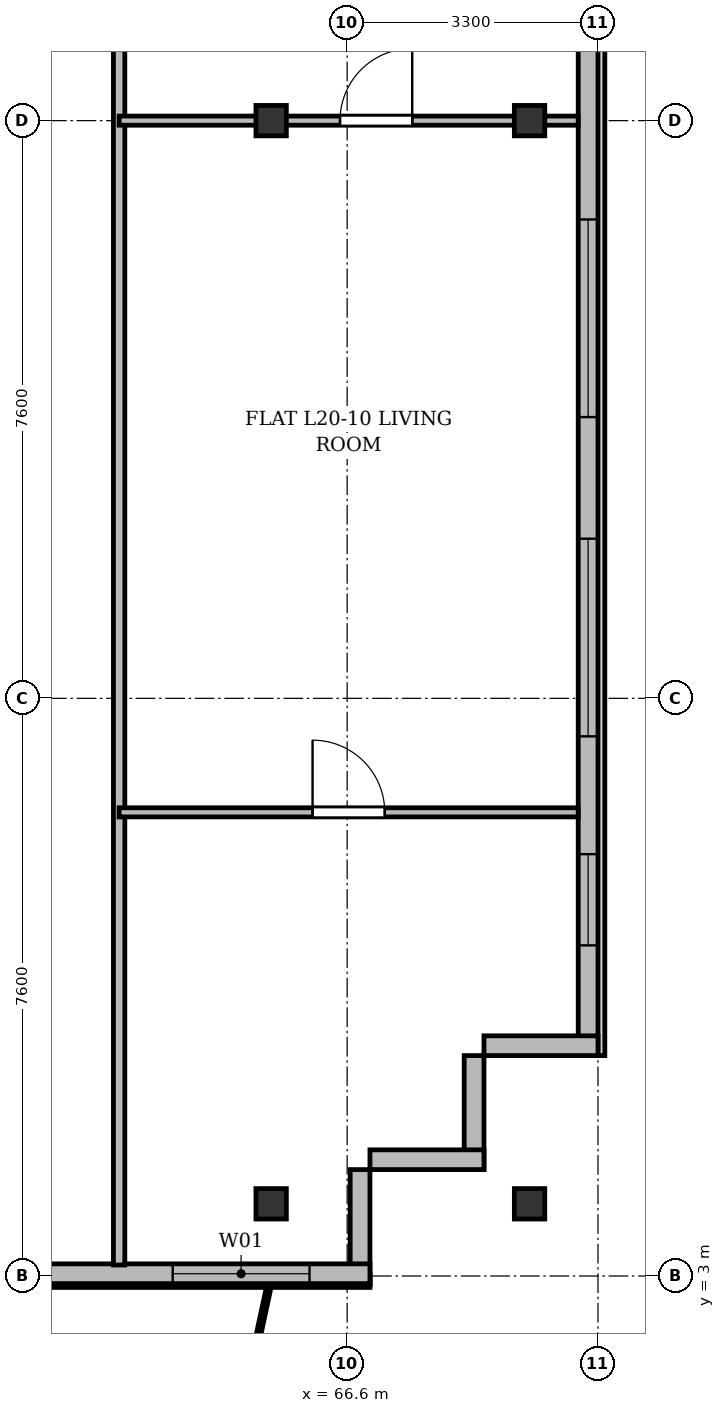
"""IFC4 building model, lengths in metres.
Left out: names, types, materials, properties, quantities, classifications, styles, units other than length and angle.
Written with IfcOpenShell. Run it as: python <this file> out.ifc"""

import sys

from ifc_helpers import new_model, si_unit, direction, frame, frame_2d, origin, origin_2d, place, context, subcontext, project, spatial, rectangle, i_section, extrude, source, transform, mapped, element, fill, save


model = new_model("IFC4")
c1 = context("Model", 3, precision=1e-05, world=origin(), true_north=direction((0.0, 1.0)))
c2 = subcontext(c1, "Body", "Model", "MODEL_VIEW")
j1 = project(units=[si_unit("LENGTHUNIT", "METRE"), si_unit("PLANEANGLEUNIT", "RADIAN")], contexts=[c1])
p1 = place(None, origin())
s1 = spatial("IfcSite", under=j1, at=p1, CompositionType="ELEMENT")
p2 = place(p1, origin())
s2 = spatial("IfcBuilding", under=s1, at=p2, CompositionType="ELEMENT")
p3 = place(p2, frame((0.0, 0.0, 81.7)))
s3 = spatial("IfcBuildingStorey", under=s2, at=p3, CompositionType="ELEMENT", Elevation=81.7)
m1 = source(origin(), c2, "Body", "SweptSolid", [
    extrude(i_section(OverallWidth=0.4, OverallDepth=0.4, WebThickness=0.022, FlangeThickness=0.035, at=origin_2d()), origin(), (0.0, 0.0, 1.0), 3.6),
])
for number, where, z_axis, x_axis in (
    (1, (65.6, 3.95, 0.0), (0.0, 0.0, 1.0), (1.0, 0.0, 0.0)),
    (2, (65.6, 18.2, 0.0), (0.0, 0.0, 1.0), (1.0, 0.0, 0.0)),
    (3, (69.0, 3.95, 0.0), (0.0, 0.0, 1.0), (1.0, 0.0, 0.0)),
    (4, (69.0, 18.2, 0.0), (0.0, 0.0, 1.0), (1.0, 0.0, 0.0)),
):
    element("IfcColumn", number, at=place(p3, frame(where, z_axis=z_axis, x_axis=x_axis)), inside=s3, PredefinedType="COLUMN", context=c2, shape_type="MappedRepresentation", body=[
        mapped(m1, transform((0.0, 0.0, 0.0), x_axis=(1.0, 0.0, 0.0), y_axis=(0.0, 1.0, 0.0), z_axis=(0.0, 0.0, 1.0), scale=1.0)),
    ])
p4 = place(p3, frame((69.77, 45.5, 0.0), z_axis=(0.0, 0.0, 1.0), x_axis=(0.0, -1.0, 0.0)))
e5 = element("IfcWall", 5, at=p4, inside=s3, PredefinedType="SOLIDWALL", context=c2, shape_type="SweptSolid", body=[
    extrude(rectangle(XDim=39.6, YDim=0.26, at=frame_2d((19.8, 0.0))), origin(), (0.0, 0.0, 1.0), 3.34),
])
p5 = place(p4, frame((36.95, 0.0, 0.92)))
e6 = element("IfcOpeningElement", 6, at=p5, cuts=e5, PredefinedType="OPENING", context=c2, shape_type="SweptSolid", body=[
    extrude(rectangle(XDim=1.2, YDim=1.65, at=frame_2d((0.6, 0.825))), frame((0.0, 0.14, 0.0), z_axis=(0.0, -1.0, 0.0), x_axis=(1.0, 0.0, 0.0)), (0.0, 0.0, 1.0), 0.28),
])
p6 = place(p4, frame((32.8, 0.0, 0.92)))
e7 = element("IfcOpeningElement", 7, at=p6, cuts=e5, PredefinedType="OPENING", context=c2, shape_type="SweptSolid", body=[
    extrude(rectangle(XDim=2.6, YDim=1.9, at=frame_2d((1.3, 0.95))), frame((0.0, 0.14, 0.0), z_axis=(0.0, -1.0, 0.0), x_axis=(1.0, 0.0, 0.0)), (0.0, 0.0, 1.0), 0.28),
])
p7 = place(p4, frame((28.6, 0.0, 0.92)))
e8 = element("IfcOpeningElement", 8, at=p7, cuts=e5, PredefinedType="OPENING", context=c2, shape_type="SweptSolid", body=[
    extrude(rectangle(XDim=2.6, YDim=1.9, at=frame_2d((1.3, 0.95))), frame((0.0, 0.14, 0.0), z_axis=(0.0, -1.0, 0.0), x_axis=(1.0, 0.0, 0.0)), (0.0, 0.0, 1.0), 0.28),
])
p8 = place(p4, frame((21.4, 0.0, 0.92)))
e9 = element("IfcOpeningElement", 9, at=p8, cuts=e5, PredefinedType="OPENING", context=c2, shape_type="SweptSolid", body=[
    extrude(rectangle(XDim=2.6, YDim=1.9, at=frame_2d((1.3, 0.95))), frame((0.0, 0.14, 0.0), z_axis=(0.0, -1.0, 0.0), x_axis=(1.0, 0.0, 0.0)), (0.0, 0.0, 1.0), 0.28),
])
p9 = place(p4, frame((7.4, 0.0, 0.92)))
e10 = element("IfcOpeningElement", 10, at=p9, cuts=e5, PredefinedType="OPENING", context=c2, shape_type="SweptSolid", body=[
    extrude(rectangle(XDim=2.6, YDim=1.9, at=frame_2d((1.3, 0.95))), frame((0.0, 0.14, 0.0), z_axis=(0.0, -1.0, 0.0), x_axis=(1.0, 0.0, 0.0)), (0.0, 0.0, 1.0), 0.28),
])
p10 = place(p4, frame((4.5, 0.0, 0.92)))
e11 = element("IfcOpeningElement", 11, at=p10, cuts=e5, PredefinedType="OPENING", context=c2, shape_type="SweptSolid", body=[
    extrude(rectangle(XDim=1.2, YDim=1.65, at=frame_2d((0.6, 0.825))), frame((0.0, 0.14, 0.0), z_axis=(0.0, -1.0, 0.0), x_axis=(1.0, 0.0, 0.0)), (0.0, 0.0, 1.0), 0.28),
])
p11 = place(p4, frame((1.15, 0.0, 0.92)))
e12 = element("IfcOpeningElement", 12, at=p11, cuts=e5, PredefinedType="OPENING", context=c2, shape_type="SweptSolid", body=[
    extrude(rectangle(XDim=1.2, YDim=1.65, at=frame_2d((0.6, 0.825))), frame((0.0, 0.14, 0.0), z_axis=(0.0, -1.0, 0.0), x_axis=(1.0, 0.0, 0.0)), (0.0, 0.0, 1.0), 0.28),
])
p12 = place(p3, frame((69.9, 6.03, 0.0), z_axis=(0.0, 0.0, 1.0), x_axis=(-1.0, 0.0, 0.0)))
e13 = element("IfcWall", 13, at=p12, inside=s3, PredefinedType="SOLIDWALL", context=c2, shape_type="SweptSolid", body=[
    extrude(rectangle(XDim=1.5, YDim=0.26, at=frame_2d((0.75, 0.0))), origin(), (0.0, 0.0, 1.0), 2.84),
])
for number, where, z_axis, x_axis in (
    (14, (68.27, 5.9, 0.0), (0.0, 0.0, 1.0), (0.0, -1.0, 0.0)),
    (15, (68.4, 4.53, 0.0), (0.0, 0.0, 1.0), (-1.0, 0.0, 0.0)),
):
    element("IfcWall", number, at=place(p3, frame(where, z_axis=z_axis, x_axis=x_axis)), inside=s3, PredefinedType="SOLIDWALL", context=c2, shape_type="SweptSolid", body=[
        extrude(rectangle(XDim=1.5, YDim=0.26, at=frame_2d((0.75, 0.0))), origin(), (0.0, 0.0, 1.0), 3.34),
    ])
p13 = place(p3, frame((66.77, 4.4, 0.0), z_axis=(0.0, 0.0, 1.0), x_axis=(0.0, -1.0, 0.0)))
e16 = element("IfcWall", 16, at=p13, inside=s3, PredefinedType="SOLIDWALL", context=c2, shape_type="SweptSolid", body=[
    extrude(rectangle(XDim=1.5, YDim=0.26, at=frame_2d((0.75, 0.0))), origin(), (0.0, 0.0, 1.0), 2.752),
])
p14 = place(p3, frame((66.9, 3.03, 0.0), z_axis=(0.0, 0.0, 1.0), x_axis=(-1.0, 0.0, 0.0)))
e17 = element("IfcWall", 17, at=p14, inside=s3, PredefinedType="SOLIDWALL", context=c2, shape_type="SweptSolid", body=[
    extrude(rectangle(XDim=59.4, YDim=0.26, at=frame_2d((29.7, 0.0))), origin(), (0.0, 0.0, 1.0), 3.34),
])
p15 = place(p14, frame((0.795, 0.0, 0.9)))
e18 = element("IfcOpeningElement", 18, at=p15, cuts=e17, PredefinedType="OPENING", context=c2, shape_type="SweptSolid", body=[
    extrude(rectangle(XDim=1.8, YDim=1.8, at=frame_2d((0.9, 0.9))), frame((0.0, 0.14, 0.0), z_axis=(0.0, -1.0, 0.0), x_axis=(1.0, 0.0, 0.0)), (0.0, 0.0, 1.0), 0.28),
])
p16 = place(p14, frame((4.6, 0.0, 0.9)))
e19 = element("IfcOpeningElement", 19, at=p16, cuts=e17, PredefinedType="OPENING", context=c2, shape_type="SweptSolid", body=[
    extrude(rectangle(XDim=2.2, YDim=1.8, at=frame_2d((1.1, 0.9))), frame((0.0, 0.14, 0.0), z_axis=(0.0, -1.0, 0.0), x_axis=(1.0, 0.0, 0.0)), (0.0, 0.0, 1.0), 0.28),
])
p17 = place(p14, frame((9.18, 0.0, 0.0)))
e20 = element("IfcOpeningElement", 20, at=p17, cuts=e17, PredefinedType="OPENING", context=c2, shape_type="SweptSolid", body=[
    extrude(rectangle(XDim=1.2, YDim=2.2, at=frame_2d((0.6, 1.1))), frame((0.0, 0.14, 0.0), z_axis=(0.0, -1.0, 0.0), x_axis=(1.0, 0.0, 0.0)), (0.0, 0.0, 1.0), 0.28),
])
p18 = place(p14, frame((12.95, 0.0, 0.9)))
e21 = element("IfcOpeningElement", 21, at=p18, cuts=e17, PredefinedType="OPENING", context=c2, shape_type="SweptSolid", body=[
    extrude(rectangle(XDim=2.0, YDim=1.95, at=frame_2d((1.0, 0.975))), frame((0.0, 0.14, 0.0), z_axis=(0.0, -1.0, 0.0), x_axis=(1.0, 0.0, 0.0)), (0.0, 0.0, 1.0), 0.28),
])
p19 = place(p14, frame((16.275, 0.0, 0.9)))
e22 = element("IfcOpeningElement", 22, at=p19, cuts=e17, PredefinedType="OPENING", context=c2, shape_type="SweptSolid", body=[
    extrude(rectangle(XDim=1.65, YDim=1.85, at=frame_2d((0.825, 0.925))), frame((0.0, 0.14, 0.0), z_axis=(0.0, -1.0, 0.0), x_axis=(1.0, 0.0, 0.0)), (0.0, 0.0, 1.0), 0.28),
])
p20 = place(p14, frame((18.6, 0.0, 0.9)))
e23 = element("IfcOpeningElement", 23, at=p20, cuts=e17, PredefinedType="OPENING", context=c2, shape_type="SweptSolid", body=[
    extrude(rectangle(XDim=1.8, YDim=1.8, at=frame_2d((0.9, 0.9))), frame((0.0, 0.14, 0.0), z_axis=(0.0, -1.0, 0.0), x_axis=(1.0, 0.0, 0.0)), (0.0, 0.0, 1.0), 0.28),
])
p21 = place(p14, frame((21.15, 0.0, 0.9)))
e24 = element("IfcOpeningElement", 24, at=p21, cuts=e17, PredefinedType="OPENING", context=c2, shape_type="SweptSolid", body=[
    extrude(rectangle(XDim=1.5, YDim=1.75, at=frame_2d((0.75, 0.875))), frame((0.0, 0.14, 0.0), z_axis=(0.0, -1.0, 0.0), x_axis=(1.0, 0.0, 0.0)), (0.0, 0.0, 1.0), 0.28),
])
p22 = place(p14, frame((24.1, 0.0, 0.9)))
e25 = element("IfcOpeningElement", 25, at=p22, cuts=e17, PredefinedType="OPENING", context=c2, shape_type="SweptSolid", body=[
    extrude(rectangle(XDim=1.5, YDim=1.75, at=frame_2d((0.75, 0.875))), frame((0.0, 0.14, 0.0), z_axis=(0.0, -1.0, 0.0), x_axis=(1.0, 0.0, 0.0)), (0.0, 0.0, 1.0), 0.28),
])
p23 = place(p14, frame((27.35, 0.0, 0.9)))
e26 = element("IfcOpeningElement", 26, at=p23, cuts=e17, PredefinedType="OPENING", context=c2, shape_type="SweptSolid", body=[
    extrude(rectangle(XDim=2.0, YDim=1.95, at=frame_2d((1.0, 0.975))), frame((0.0, 0.14, 0.0), z_axis=(0.0, -1.0, 0.0), x_axis=(1.0, 0.0, 0.0)), (0.0, 0.0, 1.0), 0.28),
])
p24 = place(p14, frame((32.375, 0.0, 0.9)))
e27 = element("IfcOpeningElement", 27, at=p24, cuts=e17, PredefinedType="OPENING", context=c2, shape_type="SweptSolid", body=[
    extrude(rectangle(XDim=1.65, YDim=1.85, at=frame_2d((0.825, 0.925))), frame((0.0, 0.14, 0.0), z_axis=(0.0, -1.0, 0.0), x_axis=(1.0, 0.0, 0.0)), (0.0, 0.0, 1.0), 0.28),
])
p25 = place(p14, frame((40.301, 0.0, 0.0)))
e28 = element("IfcOpeningElement", 28, at=p25, cuts=e17, PredefinedType="OPENING", context=c2, shape_type="SweptSolid", body=[
    extrude(rectangle(XDim=1.2, YDim=2.2, at=frame_2d((0.6, 1.1))), frame((0.0, 0.14, 0.0), z_axis=(0.0, -1.0, 0.0), x_axis=(1.0, 0.0, 0.0)), (0.0, 0.0, 1.0), 0.28),
])
p26 = place(p14, frame((46.3, 0.0, 0.9)))
e29 = element("IfcOpeningElement", 29, at=p26, cuts=e17, PredefinedType="OPENING", context=c2, shape_type="SweptSolid", body=[
    extrude(rectangle(XDim=2.2, YDim=1.8, at=frame_2d((1.1, 0.9))), frame((0.0, 0.14, 0.0), z_axis=(0.0, -1.0, 0.0), x_axis=(1.0, 0.0, 0.0)), (0.0, 0.0, 1.0), 0.28),
])
p27 = place(p14, frame((54.558, 0.0, 0.0)))
e30 = element("IfcOpeningElement", 30, at=p27, cuts=e17, PredefinedType="OPENING", context=c2, shape_type="SweptSolid", body=[
    extrude(rectangle(XDim=1.2, YDim=2.2, at=frame_2d((0.6, 1.1))), frame((0.0, 0.14, 0.0), z_axis=(0.0, -1.0, 0.0), x_axis=(1.0, 0.0, 0.0)), (0.0, 0.0, 1.0), 0.28),
])
p28 = place(p14, frame((56.805, 0.0, 0.9)))
e31 = element("IfcOpeningElement", 31, at=p28, cuts=e17, PredefinedType="OPENING", context=c2, shape_type="SweptSolid", body=[
    extrude(rectangle(XDim=2.0, YDim=1.95, at=frame_2d((1.0, 0.975))), frame((0.0, 0.14, 0.0), z_axis=(0.0, -1.0, 0.0), x_axis=(1.0, 0.0, 0.0)), (0.0, 0.0, 1.0), 0.28),
])
p29 = place(p3, frame((63.6, 3.145, 0.0), z_axis=(0.0, 0.0, 1.0), x_axis=(0.0, 1.0, 0.0)))
e32 = element("IfcWall", 32, at=p29, inside=s3, PredefinedType="PARTITIONING", context=c2, shape_type="SweptSolid", body=[
    extrude(rectangle(XDim=24.455, YDim=0.15, at=frame_2d((12.228, 0.0))), origin(), (0.0, 0.0, 1.0), 2.752),
])
p30 = place(p3, frame((63.6, 18.2, 0.0), z_axis=(0.0, 0.0, 1.0), x_axis=(1.0, 0.0, 0.0)))
e33 = element("IfcWall", 33, at=p30, inside=s3, PredefinedType="PARTITIONING", context=c2, shape_type="SweptSolid", body=[
    extrude(rectangle(XDim=6.04, YDim=0.12, at=frame_2d((3.02, 0.0))), origin(), (0.0, 0.0, 1.0), 2.752),
])
p31 = place(p30, frame((2.906, 0.0, 0.0)))
e34 = element("IfcOpeningElement", 34, at=p31, cuts=e33, PredefinedType="OPENING", context=c2, shape_type="SweptSolid", body=[
    extrude(rectangle(XDim=0.95, YDim=2.15, at=frame_2d((0.475, 1.075))), frame((0.0, 0.07, 0.0), z_axis=(0.0, -1.0, 0.0), x_axis=(1.0, 0.0, 0.0)), (0.0, 0.0, 1.0), 0.14),
])
p32 = place(p3, frame((63.6, 9.1, 0.0), z_axis=(0.0, 0.0, 1.0), x_axis=(1.0, 0.0, 0.0)))
e35 = element("IfcWall", 35, at=p32, inside=s3, PredefinedType="PARTITIONING", context=c2, shape_type="SweptSolid", body=[
    extrude(rectangle(XDim=6.04, YDim=0.12, at=frame_2d((3.02, 0.0))), origin(), (0.0, 0.0, 1.0), 2.84),
])
p33 = place(p32, frame((2.545, 0.0, 0.0)))
e36 = element("IfcOpeningElement", 36, at=p33, cuts=e35, PredefinedType="OPENING", context=c2, shape_type="SweptSolid", body=[
    extrude(rectangle(XDim=0.95, YDim=2.15, at=frame_2d((0.475, 1.075))), frame((0.0, 0.07, 0.0), z_axis=(0.0, -1.0, 0.0), x_axis=(1.0, 0.0, 0.0)), (0.0, 0.0, 1.0), 0.14),
])
m2 = source(origin(), c2, "Body", "SweptSolid", [
    extrude(rectangle(XDim=1.2, YDim=1.65, at=frame_2d((0.6, 0.825))), frame((0.0, 0.03, 0.0), z_axis=(0.0, -1.0, 0.0), x_axis=(1.0, 0.0, 0.0)), (0.0, 0.0, 1.0), 0.06),
])
p34 = place(p5, origin())
e37 = element("IfcWindow", 37, at=p34, inside=s3, PartitioningType="SINGLE_PANEL", PredefinedType="WINDOW", context=c2, shape_type="MappedRepresentation", body=[
    mapped(m2, transform((0.0, 0.0, 0.0), x_axis=(1.0, 0.0, 0.0), y_axis=(0.0, 1.0, 0.0), z_axis=(0.0, 0.0, 1.0), scale=1.0)),
])
fill(e6, e37)
m3 = source(origin(), c2, "Body", "SweptSolid", [
    extrude(rectangle(XDim=2.6, YDim=1.9, at=frame_2d((1.3, 0.95))), frame((0.0, 0.03, 0.0), z_axis=(0.0, -1.0, 0.0), x_axis=(1.0, 0.0, 0.0)), (0.0, 0.0, 1.0), 0.06),
])
p35 = place(p6, origin())
e38 = element("IfcWindow", 38, at=p35, inside=s3, PartitioningType="SINGLE_PANEL", PredefinedType="WINDOW", context=c2, shape_type="MappedRepresentation", body=[
    mapped(m3, transform((0.0, 0.0, 0.0), x_axis=(1.0, 0.0, 0.0), y_axis=(0.0, 1.0, 0.0), z_axis=(0.0, 0.0, 1.0), scale=1.0)),
])
fill(e7, e38)
p36 = place(p7, origin())
e39 = element("IfcWindow", 39, at=p36, inside=s3, PartitioningType="SINGLE_PANEL", PredefinedType="WINDOW", context=c2, shape_type="MappedRepresentation", body=[
    mapped(m3, transform((0.0, 0.0, 0.0), x_axis=(1.0, 0.0, 0.0), y_axis=(0.0, 1.0, 0.0), z_axis=(0.0, 0.0, 1.0), scale=1.0)),
])
fill(e8, e39)
m4 = source(origin(), c2, "Body", "SweptSolid", [
    extrude(rectangle(XDim=1.8, YDim=1.8, at=frame_2d((0.9, 0.9))), frame((0.0, 0.03, 0.0), z_axis=(0.0, -1.0, 0.0), x_axis=(1.0, 0.0, 0.0)), (0.0, 0.0, 1.0), 0.06),
])
p37 = place(p15, origin())
e40 = element("IfcWindow", 40, at=p37, inside=s3, PartitioningType="SINGLE_PANEL", PredefinedType="WINDOW", context=c2, shape_type="MappedRepresentation", body=[
    mapped(m4, transform((0.0, 0.0, 0.0), x_axis=(1.0, 0.0, 0.0), y_axis=(0.0, 1.0, 0.0), z_axis=(0.0, 0.0, 1.0), scale=1.0)),
])
fill(e18, e40)
m5 = source(origin(), c2, "Body", "SweptSolid", [
    extrude(rectangle(XDim=0.95, YDim=2.15, at=frame_2d((0.475, 1.075))), frame((0.0, 0.025, 0.0), z_axis=(0.0, -1.0, 0.0), x_axis=(1.0, 0.0, 0.0)), (0.0, 0.0, 1.0), 0.05),
])
p38 = place(p31, origin())
e41 = element("IfcDoor", 41, at=p38, inside=s3, OperationType="SINGLE_SWING_RIGHT", PredefinedType="DOOR", context=c2, shape_type="MappedRepresentation", body=[
    mapped(m5, transform((0.0, 0.0, 0.0), x_axis=(1.0, 0.0, 0.0), y_axis=(0.0, 1.0, 0.0), z_axis=(0.0, 0.0, 1.0), scale=1.0)),
])
fill(e34, e41)
p39 = place(p33, origin())
e42 = element("IfcDoor", 42, at=p39, inside=s3, OperationType="SINGLE_SWING_LEFT", PredefinedType="DOOR", context=c2, shape_type="MappedRepresentation", body=[
    mapped(m5, transform((0.0, 0.0, 0.0), x_axis=(1.0, 0.0, 0.0), y_axis=(0.0, 1.0, 0.0), z_axis=(0.0, 0.0, 1.0), scale=1.0)),
])
fill(e36, e42)
save(model, sys.argv[1])
